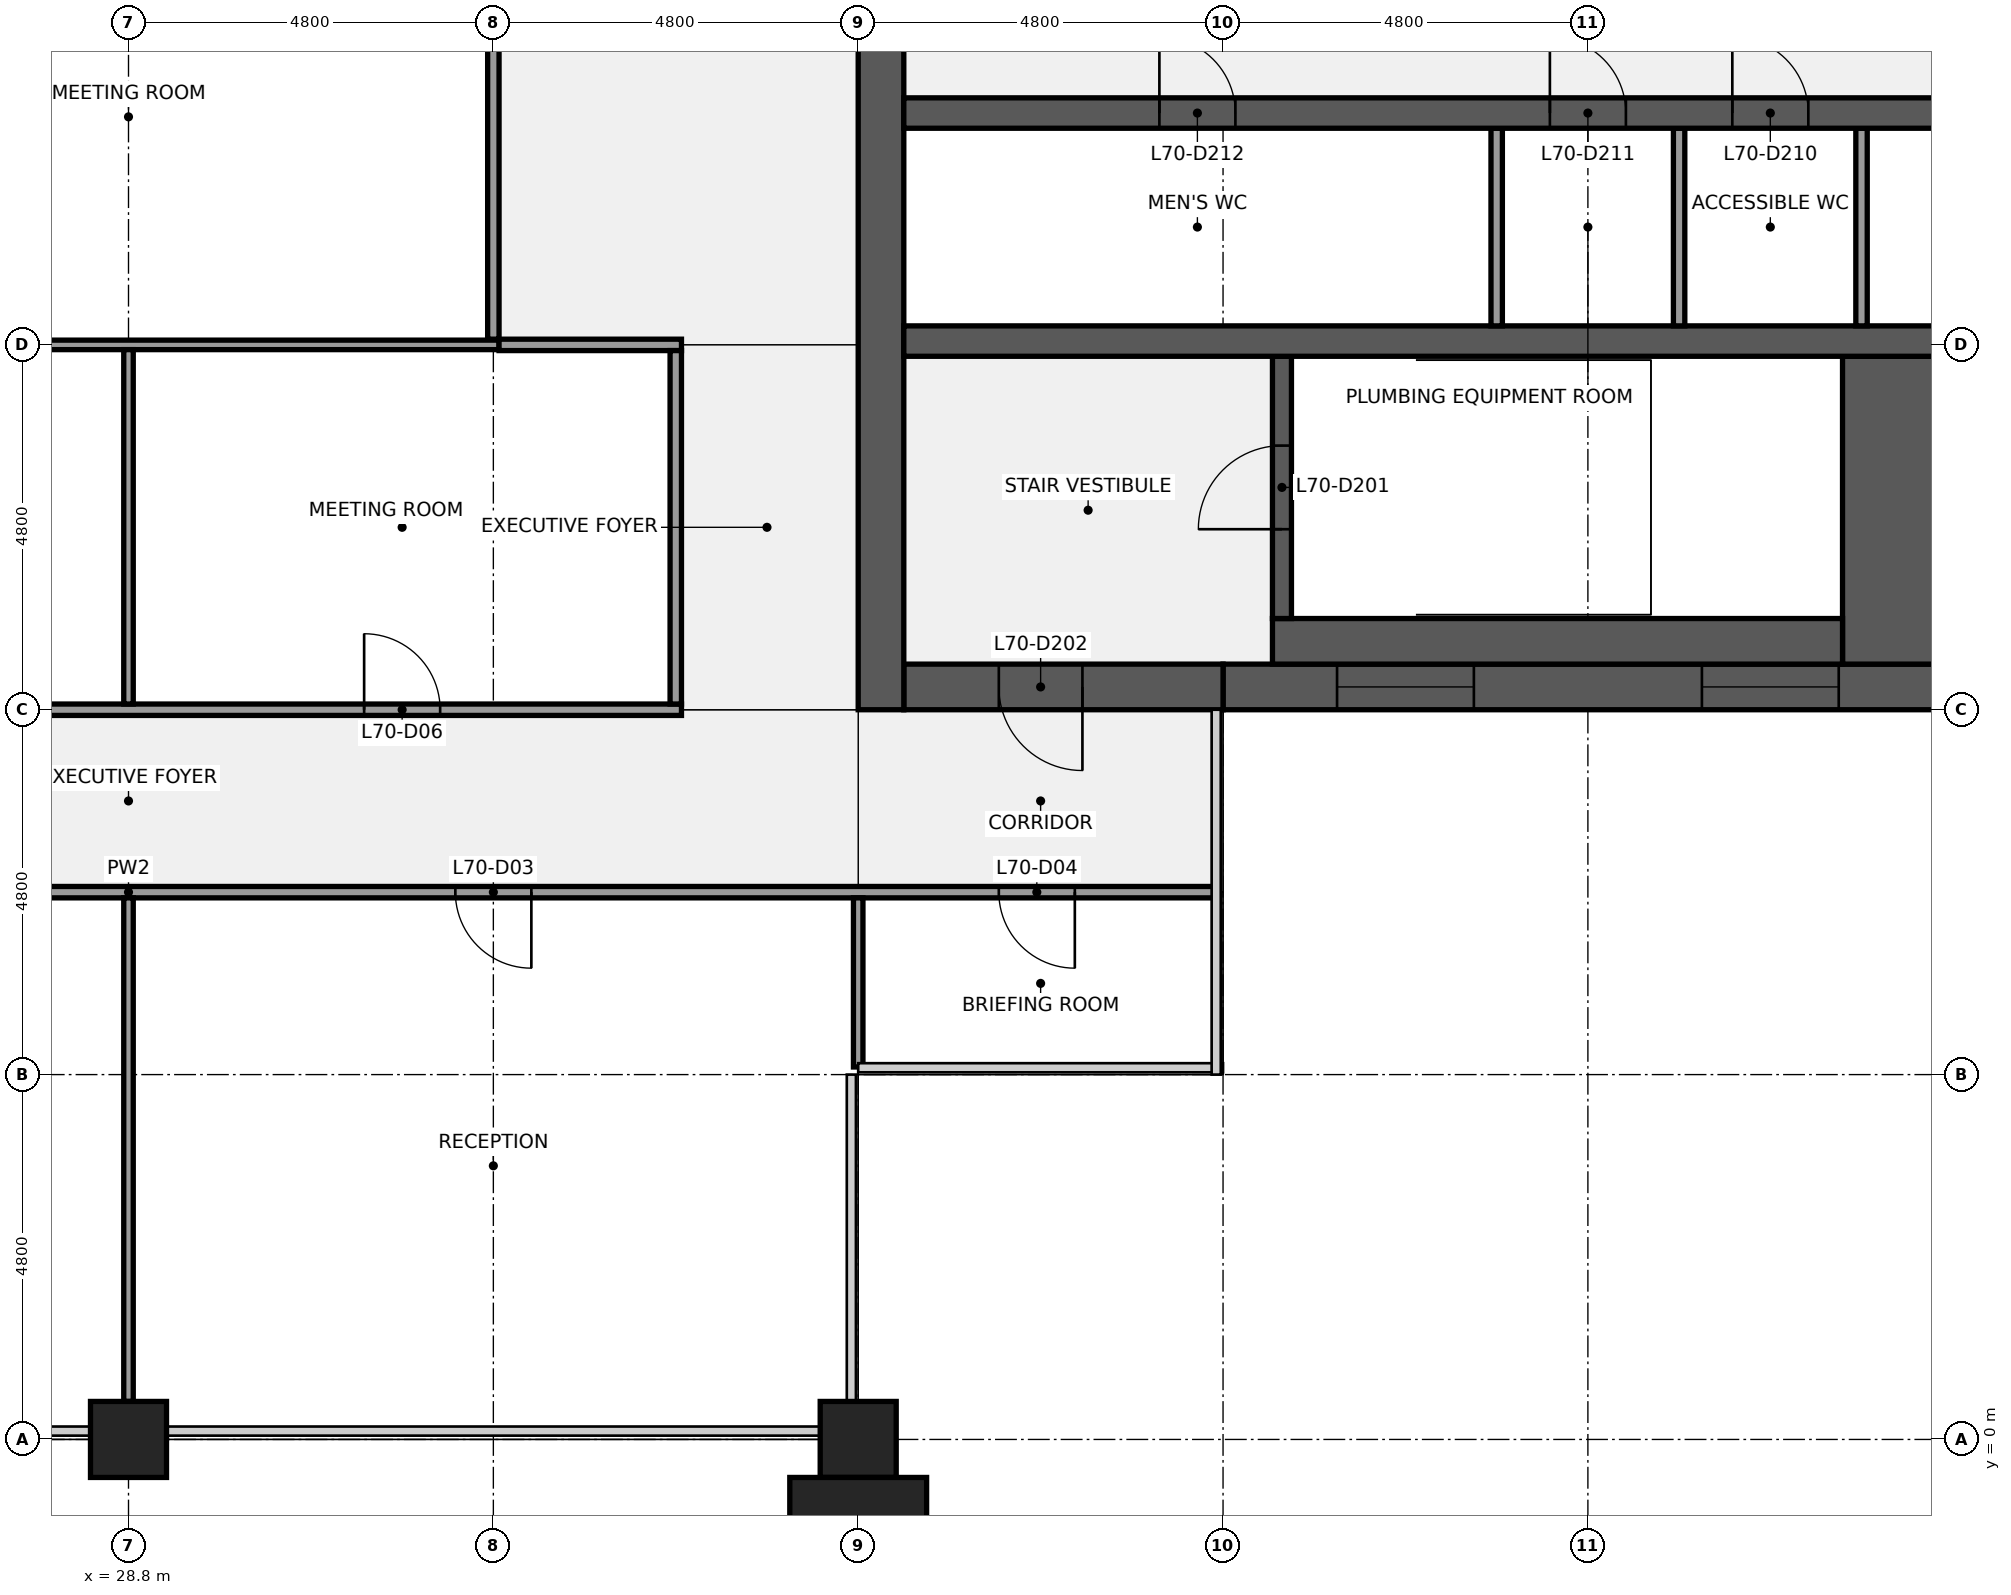
"""IFC4 building model, lengths in metres.
Left out: names, types, materials, properties, quantities, classifications, styles, units other than length and angle.
Written with IfcOpenShell. Run it as: python <this file> out.ifc"""

import sys

from ifc_helpers import new_model, si_unit, direction, frame, frame_2d, origin, origin_2d, place, context, subcontext, project, spatial, rectangle, extrude, element, fill, save


model = new_model("IFC4")
c1 = context("Model", 3, precision=1e-05, world=origin(), true_north=direction((0.0, 1.0)))
c2 = subcontext(c1, "Body", "Model", "MODEL_VIEW")
j1 = project(units=[si_unit("LENGTHUNIT", "METRE"), si_unit("PLANEANGLEUNIT", "RADIAN")], contexts=[c1])
p1 = place(None, origin())
s1 = spatial("IfcSite", under=j1, at=p1, CompositionType="ELEMENT")
p2 = place(p1, origin())
s2 = spatial("IfcBuilding", under=s1, at=p2, CompositionType="ELEMENT")
p3 = place(p2, frame((0.0, 0.0, 318.3)))
s3 = spatial("IfcBuildingStorey", under=s2, at=p3, CompositionType="ELEMENT", Elevation=318.3)
for number, where, z_axis, x_axis in (
    (1, (28.8, 0.0, 0.0), (0.0, 0.0, 1.0), (1.0, 0.0, 0.0)),
    (2, (38.4, 0.0, 0.0), (0.0, 0.0, 1.0), (1.0, 0.0, 0.0)),
):
    element("IfcColumn", number, at=place(p3, frame(where, z_axis=z_axis, x_axis=x_axis)), inside=s3, PredefinedType="COLUMN", context=c2, shape_type="SweptSolid", body=[
        extrude(rectangle(XDim=1.0, YDim=1.0, at=origin_2d()), origin(), (0.0, 0.0, 1.0), 4.0),
    ])
p4 = place(p3, frame((57.0, 9.9, 0.0), z_axis=(0.0, 0.0, 1.0), x_axis=(-1.0, 0.0, 0.0)))
e3 = element("IfcWall", 3, at=p4, inside=s3, PredefinedType="SHEAR", context=c2, shape_type="SweptSolid", body=[
    extrude(rectangle(XDim=13.8, YDim=0.6, at=frame_2d((6.9, 0.0))), origin(), (0.0, 0.0, 1.0), 3.84),
])
p5 = place(p4, frame((5.7, 0.0, 0.9)))
e4 = element("IfcOpeningElement", 4, at=p5, cuts=e3, PredefinedType="OPENING", context=c2, shape_type="SweptSolid", body=[
    extrude(rectangle(XDim=1.8, YDim=1.5, at=frame_2d((0.9, 0.75))), frame((0.0, 0.31, 0.0), z_axis=(0.0, -1.0, 0.0), x_axis=(1.0, 0.0, 0.0)), (0.0, 0.0, 1.0), 0.62),
])
p6 = place(p4, frame((10.5, 0.0, 0.9)))
e5 = element("IfcOpeningElement", 5, at=p6, cuts=e3, PredefinedType="OPENING", context=c2, shape_type="SweptSolid", body=[
    extrude(rectangle(XDim=1.8, YDim=1.5, at=frame_2d((0.9, 0.75))), frame((0.0, 0.31, 0.0), z_axis=(0.0, -1.0, 0.0), x_axis=(1.0, 0.0, 0.0)), (0.0, 0.0, 1.0), 0.62),
])
p7 = place(p3, frame((43.2, 9.9, 0.0), z_axis=(0.0, 0.0, 1.0), x_axis=(-1.0, 0.0, 0.0)))
e6 = element("IfcWall", 6, at=p7, inside=s3, PredefinedType="SHEAR", context=c2, shape_type="SweptSolid", body=[
    extrude(rectangle(XDim=4.2, YDim=0.6, at=frame_2d((2.1, 0.0))), origin(), (0.0, 0.0, 1.0), 3.84),
])
p8 = place(p7, frame((1.85, 0.0, 0.0)))
e7 = element("IfcOpeningElement", 7, at=p8, cuts=e6, PredefinedType="OPENING", context=c2, shape_type="SweptSolid", body=[
    extrude(rectangle(XDim=1.1, YDim=2.1, at=frame_2d((0.55, 1.05))), frame((0.0, 0.31, 0.0), z_axis=(0.0, -1.0, 0.0), x_axis=(1.0, 0.0, 0.0)), (0.0, 0.0, 1.0), 0.62),
])
p9 = place(p3, frame((38.7, 9.6, 0.0), z_axis=(0.0, 0.0, 1.0), x_axis=(0.0, 1.0, 0.0)))
e8 = element("IfcWall", 8, at=p9, inside=s3, PredefinedType="SHEAR", context=c2, shape_type="SweptSolid", body=[
    extrude(rectangle(XDim=28.8, YDim=0.6, at=frame_2d((14.4, 0.0))), origin(), (0.0, 0.0, 1.0), 3.84),
])
p10 = place(p9, frame((8.7, 0.0, 0.0)))
e9 = element("IfcOpeningElement", 9, at=p10, cuts=e8, PredefinedType="OPENING", context=c2, shape_type="SweptSolid", body=[
    extrude(rectangle(XDim=1.8, YDim=2.1, at=frame_2d((0.9, 1.05))), frame((0.0, 0.31, 0.0), z_axis=(0.0, -1.0, 0.0), x_axis=(1.0, 0.0, 0.0)), (0.0, 0.0, 1.0), 0.62),
])
p11 = place(p9, frame((18.3, 0.0, 0.0)))
e10 = element("IfcOpeningElement", 10, at=p11, cuts=e8, PredefinedType="OPENING", context=c2, shape_type="SweptSolid", body=[
    extrude(rectangle(XDim=1.8, YDim=2.1, at=frame_2d((0.9, 1.05))), frame((0.0, 0.31, 0.0), z_axis=(0.0, -1.0, 0.0), x_axis=(1.0, 0.0, 0.0)), (0.0, 0.0, 1.0), 0.62),
])
p12 = place(p3, frame((51.35, 12.225, 0.0), z_axis=(0.0, 0.0, 1.0), x_axis=(1.0, 0.0, 0.0)))
e11 = element("IfcWall", 11, at=p12, inside=s3, PredefinedType="SHEAR", context=c2, shape_type="SweptSolid", body=[
    extrude(rectangle(XDim=5.65, YDim=4.05, at=frame_2d((2.825, 0.0))), origin(), (0.0, 0.0, 1.0), 3.84),
])
p13 = place(p3, frame((43.85, 10.5, 0.0), z_axis=(0.0, 0.0, 1.0), x_axis=(1.0, 0.0, 0.0)))
e12 = element("IfcWall", 12, at=p13, inside=s3, PredefinedType="SHEAR", context=c2, shape_type="SweptSolid", body=[
    extrude(rectangle(XDim=7.5, YDim=0.6, at=frame_2d((3.75, 0.0))), origin(), (0.0, 0.0, 1.0), 3.84),
])
p14 = place(p3, frame((43.975, 10.8, 0.0), z_axis=(0.0, 0.0, 1.0), x_axis=(0.0, 1.0, 0.0)))
e13 = element("IfcWall", 13, at=p14, inside=s3, PredefinedType="SHEAR", context=c2, shape_type="SweptSolid", body=[
    extrude(rectangle(XDim=3.45, YDim=0.25, at=frame_2d((1.725, 0.0))), origin(), (0.0, 0.0, 1.0), 3.84),
])
p15 = place(p14, frame((1.175, 0.0, 0.0)))
e14 = element("IfcOpeningElement", 14, at=p15, cuts=e13, PredefinedType="OPENING", context=c2, shape_type="SweptSolid", body=[
    extrude(rectangle(XDim=1.1, YDim=2.1, at=frame_2d((0.55, 1.05))), frame((0.0, 0.135, 0.0), z_axis=(0.0, -1.0, 0.0), x_axis=(1.0, 0.0, 0.0)), (0.0, 0.0, 1.0), 0.27),
])
p16 = place(p3, frame((39.0, 14.45, 0.0), z_axis=(0.0, 0.0, 1.0), x_axis=(1.0, 0.0, 0.0)))
e15 = element("IfcWall", 15, at=p16, inside=s3, PredefinedType="SHEAR", context=c2, shape_type="SweptSolid", body=[
    extrude(rectangle(XDim=18.0, YDim=0.4, at=frame_2d((9.0, 0.0))), origin(), (0.0, 0.0, 1.0), 3.84),
])
for number, where, z_axis, x_axis in (
    (16, (51.6, 14.65, 0.0), (0.0, 0.0, 1.0), (0.0, 1.0, 0.0)),
    (17, (49.2, 14.65, 0.0), (0.0, 0.0, 1.0), (0.0, 1.0, 0.0)),
    (18, (46.8, 14.65, 0.0), (0.0, 0.0, 1.0), (0.0, 1.0, 0.0)),
):
    element("IfcWall", number, at=place(p3, frame(where, z_axis=z_axis, x_axis=x_axis)), inside=s3, PredefinedType="PARTITIONING", context=c2, shape_type="SweptSolid", body=[
        extrude(rectangle(XDim=2.6, YDim=0.15, at=frame_2d((1.3, 0.0))), origin(), (0.0, 0.0, 1.0), 3.84),
    ])
p17 = place(p3, frame((39.0, 17.45, 0.0), z_axis=(0.0, 0.0, 1.0), x_axis=(1.0, 0.0, 0.0)))
e19 = element("IfcWall", 19, at=p17, inside=s3, PredefinedType="SHEAR", context=c2, shape_type="SweptSolid", body=[
    extrude(rectangle(XDim=18.0, YDim=0.4, at=frame_2d((9.0, 0.0))), origin(), (0.0, 0.0, 1.0), 3.84),
])
p18 = place(p17, frame((14.837, 0.0, 0.0)))
e20 = element("IfcOpeningElement", 20, at=p18, cuts=e19, PredefinedType="OPENING", context=c2, shape_type="SweptSolid", body=[
    extrude(rectangle(XDim=1.0, YDim=2.1, at=frame_2d((0.5, 1.05))), frame((0.0, 0.21, 0.0), z_axis=(0.0, -1.0, 0.0), x_axis=(1.0, 0.0, 0.0)), (0.0, 0.0, 1.0), 0.42),
])
p19 = place(p17, frame((10.9, 0.0, 0.0)))
e21 = element("IfcOpeningElement", 21, at=p19, cuts=e19, PredefinedType="OPENING", context=c2, shape_type="SweptSolid", body=[
    extrude(rectangle(XDim=1.0, YDim=2.1, at=frame_2d((0.5, 1.05))), frame((0.0, 0.21, 0.0), z_axis=(0.0, -1.0, 0.0), x_axis=(1.0, 0.0, 0.0)), (0.0, 0.0, 1.0), 0.42),
])
p20 = place(p17, frame((8.5, 0.0, 0.0)))
e22 = element("IfcOpeningElement", 22, at=p20, cuts=e19, PredefinedType="OPENING", context=c2, shape_type="SweptSolid", body=[
    extrude(rectangle(XDim=1.0, YDim=2.1, at=frame_2d((0.5, 1.05))), frame((0.0, 0.21, 0.0), z_axis=(0.0, -1.0, 0.0), x_axis=(1.0, 0.0, 0.0)), (0.0, 0.0, 1.0), 0.42),
])
p21 = place(p17, frame((3.363, 0.0, 0.0)))
e23 = element("IfcOpeningElement", 23, at=p21, cuts=e19, PredefinedType="OPENING", context=c2, shape_type="SweptSolid", body=[
    extrude(rectangle(XDim=1.0, YDim=2.1, at=frame_2d((0.5, 1.05))), frame((0.0, 0.21, 0.0), z_axis=(0.0, -1.0, 0.0), x_axis=(1.0, 0.0, 0.0)), (0.0, 0.0, 1.0), 0.42),
])
p22 = place(p3, frame((14.5, 7.2, 0.0), z_axis=(0.0, 0.0, 1.0), x_axis=(1.0, 0.0, 0.0)))
e24 = element("IfcWall", 24, at=p22, inside=s3, PredefinedType="PARTITIONING", context=c2, shape_type="SweptSolid", body=[
    extrude(rectangle(XDim=28.6, YDim=0.15, at=frame_2d((14.3, 0.0))), origin(), (0.0, 0.0, 1.0), 2.87),
])
p23 = place(p22, frame((1.85, 0.0, 0.0)))
e25 = element("IfcOpeningElement", 25, at=p23, cuts=e24, PredefinedType="OPENING", context=c2, shape_type="SweptSolid", body=[
    extrude(rectangle(XDim=1.0, YDim=2.1, at=frame_2d((0.5, 1.05))), frame((0.0, 0.085, 0.0), z_axis=(0.0, -1.0, 0.0), x_axis=(1.0, 0.0, 0.0)), (0.0, 0.0, 1.0), 0.17),
])
p24 = place(p22, frame((9.0, 0.0, 0.0)))
e26 = element("IfcOpeningElement", 26, at=p24, cuts=e24, PredefinedType="OPENING", context=c2, shape_type="SweptSolid", body=[
    extrude(rectangle(XDim=1.0, YDim=2.1, at=frame_2d((0.5, 1.05))), frame((0.0, 0.085, 0.0), z_axis=(0.0, -1.0, 0.0), x_axis=(1.0, 0.0, 0.0)), (0.0, 0.0, 1.0), 0.17),
])
p25 = place(p22, frame((18.6, 0.0, 0.0)))
e27 = element("IfcOpeningElement", 27, at=p25, cuts=e24, PredefinedType="OPENING", context=c2, shape_type="SweptSolid", body=[
    extrude(rectangle(XDim=1.0, YDim=2.1, at=frame_2d((0.5, 1.05))), frame((0.0, 0.085, 0.0), z_axis=(0.0, -1.0, 0.0), x_axis=(1.0, 0.0, 0.0)), (0.0, 0.0, 1.0), 0.17),
])
p26 = place(p22, frame((25.75, 0.0, 0.0)))
e28 = element("IfcOpeningElement", 28, at=p26, cuts=e24, PredefinedType="OPENING", context=c2, shape_type="SweptSolid", body=[
    extrude(rectangle(XDim=1.0, YDim=2.1, at=frame_2d((0.5, 1.05))), frame((0.0, 0.085, 0.0), z_axis=(0.0, -1.0, 0.0), x_axis=(1.0, 0.0, 0.0)), (0.0, 0.0, 1.0), 0.17),
])
p27 = place(p3, frame((21.525, 9.6, 0.0), z_axis=(0.0, 0.0, 1.0), x_axis=(1.0, 0.0, 0.0)))
e29 = element("IfcWall", 29, at=p27, inside=s3, PredefinedType="PARTITIONING", context=c2, shape_type="SweptSolid", body=[
    extrude(rectangle(XDim=14.55, YDim=0.15, at=frame_2d((7.275, 0.0))), origin(), (0.0, 0.0, 1.0), 2.87),
])
p28 = place(p27, frame((3.175, 0.0, 0.0)))
e30 = element("IfcOpeningElement", 30, at=p28, cuts=e29, PredefinedType="OPENING", context=c2, shape_type="SweptSolid", body=[
    extrude(rectangle(XDim=1.0, YDim=2.1, at=frame_2d((0.5, 1.05))), frame((0.0, 0.085, 0.0), z_axis=(0.0, -1.0, 0.0), x_axis=(1.0, 0.0, 0.0)), (0.0, 0.0, 1.0), 0.17),
])
p29 = place(p27, frame((10.375, 0.0, 0.0)))
e31 = element("IfcOpeningElement", 31, at=p29, cuts=e29, PredefinedType="OPENING", context=c2, shape_type="SweptSolid", body=[
    extrude(rectangle(XDim=1.0, YDim=2.1, at=frame_2d((0.5, 1.05))), frame((0.0, 0.085, 0.0), z_axis=(0.0, -1.0, 0.0), x_axis=(1.0, 0.0, 0.0)), (0.0, 0.0, 1.0), 0.17),
])
p30 = place(p3, frame((24.075, 14.4, 0.0), z_axis=(0.0, 0.0, 1.0), x_axis=(1.0, 0.0, 0.0)))
e32 = element("IfcWall", 32, at=p30, inside=s3, PredefinedType="PARTITIONING", context=c2, shape_type="SweptSolid", body=[
    extrude(rectangle(XDim=9.6, YDim=0.125, at=frame_2d((4.8, 0.0))), origin(), (0.0, 0.0, 1.0), 2.87),
])
p31 = place(p3, frame((33.675, 14.4, 0.0), z_axis=(0.0, 0.0, 1.0), x_axis=(1.0, 0.0, 0.0)))
e33 = element("IfcWall", 33, at=p31, inside=s3, PredefinedType="PARTITIONING", context=c2, shape_type="SweptSolid", body=[
    extrude(rectangle(XDim=2.4, YDim=0.15, at=frame_2d((1.2, 0.0))), origin(), (0.0, 0.0, 1.0), 2.87),
])
p32 = place(p3, frame((28.8, 0.5, 0.0), z_axis=(0.0, 0.0, 1.0), x_axis=(0.0, 1.0, 0.0)))
e34 = element("IfcWall", 34, at=p32, inside=s3, PredefinedType="PARTITIONING", context=c2, shape_type="SweptSolid", body=[
    extrude(rectangle(XDim=6.625, YDim=0.125, at=frame_2d((3.312, 0.0))), origin(), (0.0, 0.0, 1.0), 2.87),
])
p33 = place(p3, frame((28.8, 9.675, 0.0), z_axis=(0.0, 0.0, 1.0), x_axis=(0.0, 1.0, 0.0)))
e35 = element("IfcWall", 35, at=p33, inside=s3, PredefinedType="PARTITIONING", context=c2, shape_type="SweptSolid", body=[
    extrude(rectangle(XDim=4.662, YDim=0.125, at=frame_2d((2.331, 0.0))), origin(), (0.0, 0.0, 1.0), 2.87),
])
p34 = place(p3, frame((33.6, 14.475, 0.0), z_axis=(0.0, 0.0, 1.0), x_axis=(0.0, 1.0, 0.0)))
e36 = element("IfcWall", 36, at=p34, inside=s3, PredefinedType="PARTITIONING", context=c2, shape_type="SweptSolid", body=[
    extrude(rectangle(XDim=5.85, YDim=0.15, at=frame_2d((2.925, 0.0))), origin(), (0.0, 0.0, 1.0), 2.87),
])
p35 = place(p3, frame((36.0, 9.675, 0.0), z_axis=(0.0, 0.0, 1.0), x_axis=(0.0, 1.0, 0.0)))
e37 = element("IfcWall", 37, at=p35, inside=s3, PredefinedType="PARTITIONING", context=c2, shape_type="SweptSolid", body=[
    extrude(rectangle(XDim=4.65, YDim=0.15, at=frame_2d((2.325, 0.0))), origin(), (0.0, 0.0, 1.0), 2.87),
])
p36 = place(p3, frame((38.4, 4.9, 0.0), z_axis=(0.0, 0.0, 1.0), x_axis=(0.0, 1.0, 0.0)))
e38 = element("IfcWall", 38, at=p36, inside=s3, PredefinedType="PARTITIONING", context=c2, shape_type="SweptSolid", body=[
    extrude(rectangle(XDim=2.225, YDim=0.125, at=frame_2d((1.113, 0.0))), origin(), (0.0, 0.0, 1.0), 2.87),
])
p37 = place(p3, frame((38.4, -1.0, 0.0), z_axis=(0.0, 0.0, 1.0), x_axis=(1.0, 0.0, 0.0)))
e39 = element("IfcColumn", 39, at=p37, inside=s3, PredefinedType="PILASTER", context=c2, shape_type="SweptSolid", body=[
    extrude(rectangle(XDim=1.8, YDim=1.0, at=origin_2d()), origin(), (0.0, 0.0, 1.0), 4.0),
])
p38 = place(p15, origin())
e40 = element("IfcDoor", 40, at=p38, inside=s3, OperationType="SINGLE_SWING_LEFT", PredefinedType="DOOR", context=c2, shape_type="SweptSolid", body=[
    extrude(rectangle(XDim=1.1, YDim=2.1, at=frame_2d((0.55, 1.05))), frame((0.0, 0.025, 0.0), z_axis=(0.0, -1.0, 0.0), x_axis=(1.0, 0.0, 0.0)), (0.0, 0.0, 1.0), 0.05),
])
fill(e14, e40)
p39 = place(p8, origin())
e41 = element("IfcDoor", 41, at=p39, inside=s3, OperationType="SINGLE_SWING_LEFT", PredefinedType="DOOR", context=c2, shape_type="SweptSolid", body=[
    extrude(rectangle(XDim=1.1, YDim=2.1, at=frame_2d((0.55, 1.05))), frame((0.0, 0.025, 0.0), z_axis=(0.0, -1.0, 0.0), x_axis=(1.0, 0.0, 0.0)), (0.0, 0.0, 1.0), 0.05),
])
fill(e7, e41)
p40 = place(p19, origin())
e42 = element("IfcDoor", 42, at=p40, inside=s3, OperationType="SINGLE_SWING_LEFT", PredefinedType="DOOR", context=c2, shape_type="SweptSolid", body=[
    extrude(rectangle(XDim=1.0, YDim=2.1, at=frame_2d((0.5, 1.05))), frame((0.0, 0.025, 0.0), z_axis=(0.0, -1.0, 0.0), x_axis=(1.0, 0.0, 0.0)), (0.0, 0.0, 1.0), 0.05),
])
fill(e21, e42)
p41 = place(p20, origin())
e43 = element("IfcDoor", 43, at=p41, inside=s3, OperationType="SINGLE_SWING_LEFT", PredefinedType="DOOR", context=c2, shape_type="SweptSolid", body=[
    extrude(rectangle(XDim=1.0, YDim=2.1, at=frame_2d((0.5, 1.05))), frame((0.0, 0.025, 0.0), z_axis=(0.0, -1.0, 0.0), x_axis=(1.0, 0.0, 0.0)), (0.0, 0.0, 1.0), 0.05),
])
fill(e22, e43)
p42 = place(p21, origin())
e44 = element("IfcDoor", 44, at=p42, inside=s3, OperationType="SINGLE_SWING_LEFT", PredefinedType="DOOR", context=c2, shape_type="SweptSolid", body=[
    extrude(rectangle(XDim=1.0, YDim=2.1, at=frame_2d((0.5, 1.05))), frame((0.0, 0.025, 0.0), z_axis=(0.0, -1.0, 0.0), x_axis=(1.0, 0.0, 0.0)), (0.0, 0.0, 1.0), 0.05),
])
fill(e23, e44)
p43 = place(p5, origin())
e45 = element("IfcWindow", 45, at=p43, inside=s3, PartitioningType="SINGLE_PANEL", PredefinedType="WINDOW", context=c2, shape_type="SweptSolid", body=[
    extrude(rectangle(XDim=1.8, YDim=1.5, at=frame_2d((0.9, 0.75))), frame((0.0, 0.03, 0.0), z_axis=(0.0, -1.0, 0.0), x_axis=(1.0, 0.0, 0.0)), (0.0, 0.0, 1.0), 0.06),
])
fill(e4, e45)
p44 = place(p6, origin())
e46 = element("IfcWindow", 46, at=p44, inside=s3, PartitioningType="SINGLE_PANEL", PredefinedType="WINDOW", context=c2, shape_type="SweptSolid", body=[
    extrude(rectangle(XDim=1.8, YDim=1.5, at=frame_2d((0.9, 0.75))), frame((0.0, 0.03, 0.0), z_axis=(0.0, -1.0, 0.0), x_axis=(1.0, 0.0, 0.0)), (0.0, 0.0, 1.0), 0.06),
])
fill(e5, e46)
p45 = place(p25, origin())
e47 = element("IfcDoor", 47, at=p45, inside=s3, OperationType="SINGLE_SWING_RIGHT", PredefinedType="DOOR", context=c2, shape_type="SweptSolid", body=[
    extrude(rectangle(XDim=1.0, YDim=2.1, at=frame_2d((0.5, 1.05))), frame((0.0, 0.025, 0.0), z_axis=(0.0, -1.0, 0.0), x_axis=(1.0, 0.0, 0.0)), (0.0, 0.0, 1.0), 0.05),
])
fill(e27, e47)
p46 = place(p26, origin())
e48 = element("IfcDoor", 48, at=p46, inside=s3, OperationType="SINGLE_SWING_RIGHT", PredefinedType="DOOR", context=c2, shape_type="SweptSolid", body=[
    extrude(rectangle(XDim=1.0, YDim=2.1, at=frame_2d((0.5, 1.05))), frame((0.0, 0.025, 0.0), z_axis=(0.0, -1.0, 0.0), x_axis=(1.0, 0.0, 0.0)), (0.0, 0.0, 1.0), 0.05),
])
fill(e28, e48)
p47 = place(p29, origin())
e49 = element("IfcDoor", 49, at=p47, inside=s3, OperationType="SINGLE_SWING_LEFT", PredefinedType="DOOR", context=c2, shape_type="SweptSolid", body=[
    extrude(rectangle(XDim=1.0, YDim=2.1, at=frame_2d((0.5, 1.05))), frame((0.0, 0.025, 0.0), z_axis=(0.0, -1.0, 0.0), x_axis=(1.0, 0.0, 0.0)), (0.0, 0.0, 1.0), 0.05),
])
fill(e31, e49)
save(model, sys.argv[1])
